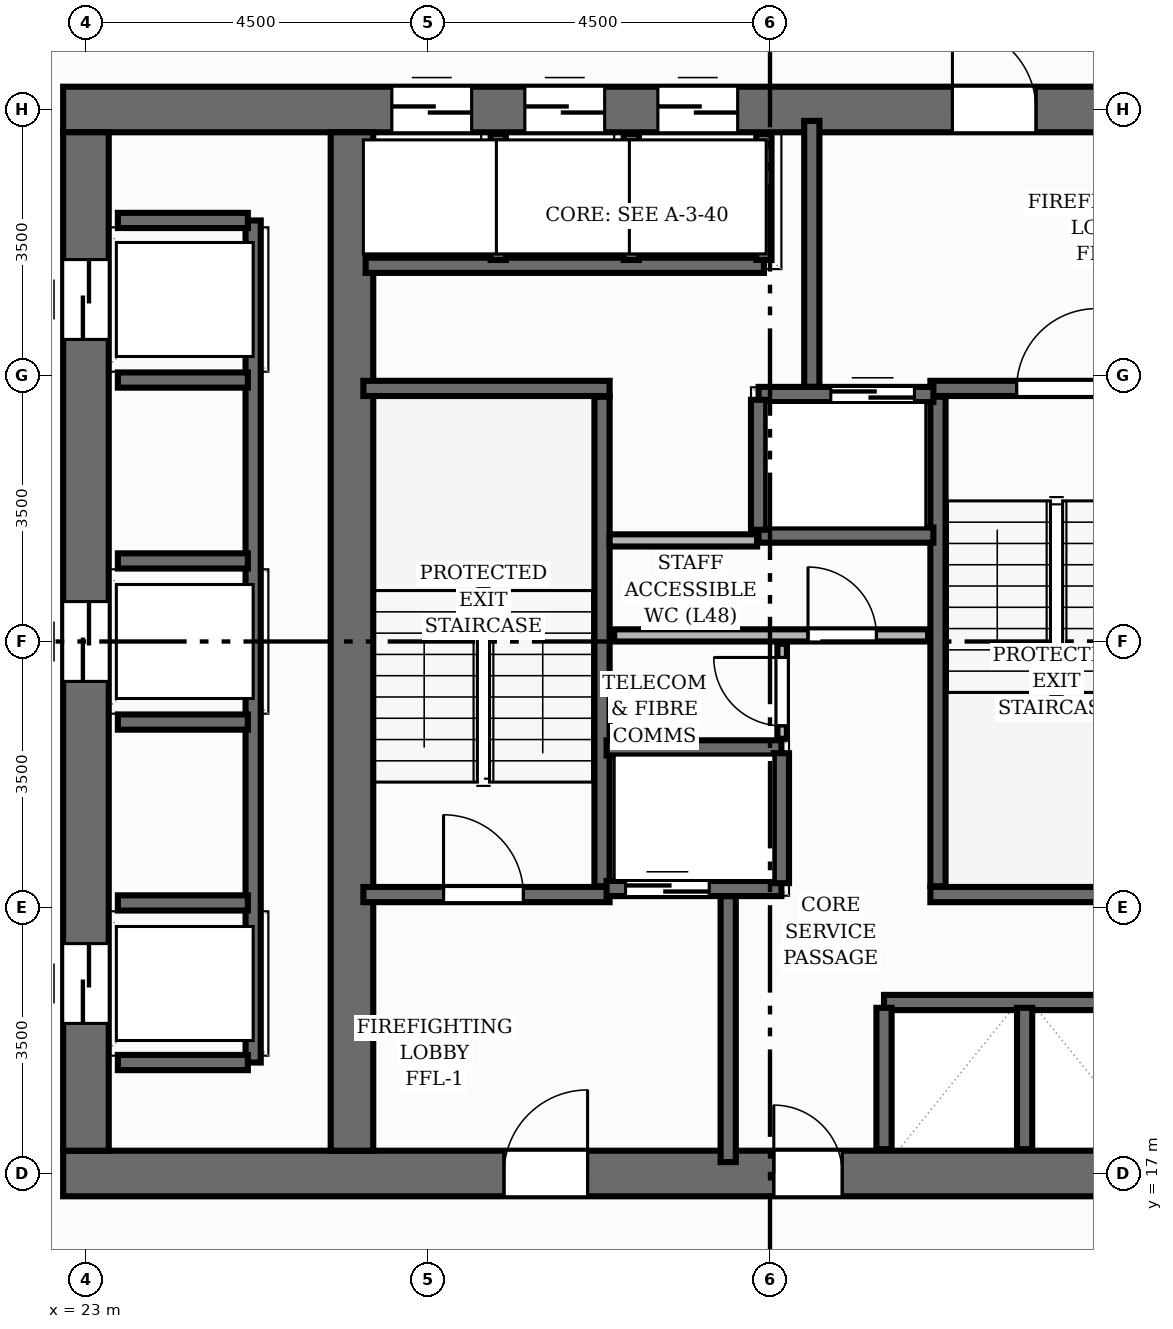
"""IFC4 building model, lengths in metres.
Left out: names, types, materials, properties, quantities, classifications, styles, units other than length and angle.
Written with IfcOpenShell. Run it as: python <this file> out.ifc"""

import sys

from ifc_helpers import new_model, si_unit, direction, frame, frame_2d, origin, place, context, subcontext, project, spatial, rectangle, extrude, element, fill, save


model = new_model("IFC4")
c1 = context("Model", 3, precision=1e-05, world=origin(), true_north=direction((0.0, 1.0)))
c2 = subcontext(c1, "Body", "Model", "MODEL_VIEW")
j1 = project(units=[si_unit("LENGTHUNIT", "METRE"), si_unit("PLANEANGLEUNIT", "RADIAN")], contexts=[c1])
p1 = place(None, origin())
s1 = spatial("IfcSite", under=j1, at=p1, CompositionType="ELEMENT")
p2 = place(p1, origin())
s2 = spatial("IfcBuilding", under=s1, at=p2, CompositionType="ELEMENT")
p3 = place(p2, frame((0.0, 0.0, 163.04)))
s3 = spatial("IfcBuildingStorey", under=s2, at=p3, CompositionType="ELEMENT", Elevation=163.04)
p4 = place(p3, frame((22.7, 17.0, 0.0), z_axis=(0.0, 0.0, 1.0), x_axis=(1.0, 0.0, 0.0)))
e1 = element("IfcWall", 1, at=p4, inside=s3, PredefinedType="SHEAR", context=c2, shape_type="SweptSolid", body=[
    extrude(rectangle(XDim=15.1, YDim=0.6, at=frame_2d((7.55, 0.0))), origin(), (0.0, 0.0, 1.0), 3.2),
])
p5 = place(p4, frame((5.8, 0.0, 0.0)))
e2 = element("IfcOpeningElement", 2, at=p5, cuts=e1, PredefinedType="OPENING", context=c2, shape_type="SweptSolid", body=[
    extrude(rectangle(XDim=1.1, YDim=2.15, at=frame_2d((0.55, 1.075))), frame((0.0, 0.31, 0.0), z_axis=(0.0, -1.0, 0.0), x_axis=(1.0, 0.0, 0.0)), (0.0, 0.0, 1.0), 0.62),
])
p6 = place(p4, frame((9.35, 0.0, 0.0)))
e3 = element("IfcOpeningElement", 3, at=p6, cuts=e1, PredefinedType="OPENING", context=c2, shape_type="SweptSolid", body=[
    extrude(rectangle(XDim=0.9, YDim=2.1, at=frame_2d((0.45, 1.05))), frame((0.0, 0.31, 0.0), z_axis=(0.0, -1.0, 0.0), x_axis=(1.0, 0.0, 0.0)), (0.0, 0.0, 1.0), 0.62),
])
p7 = place(p3, frame((22.7, 31.0, 0.0), z_axis=(0.0, 0.0, 1.0), x_axis=(1.0, 0.0, 0.0)))
e4 = element("IfcWall", 4, at=p7, inside=s3, PredefinedType="SHEAR", context=c2, shape_type="SweptSolid", body=[
    extrude(rectangle(XDim=15.1, YDim=0.6, at=frame_2d((7.55, 0.0))), origin(), (0.0, 0.0, 1.0), 3.2),
])
p8 = place(p7, frame((11.7, 0.0, 0.0)))
e5 = element("IfcOpeningElement", 5, at=p8, cuts=e4, PredefinedType="OPENING", context=c2, shape_type="SweptSolid", body=[
    extrude(rectangle(XDim=1.1, YDim=2.15, at=frame_2d((0.55, 1.075))), frame((0.0, 0.31, 0.0), z_axis=(0.0, -1.0, 0.0), x_axis=(1.0, 0.0, 0.0)), (0.0, 0.0, 1.0), 0.62),
])
p9 = place(p7, frame((4.325, 0.0, 0.0)))
e6 = element("IfcOpeningElement", 6, at=p9, cuts=e4, PredefinedType="OPENING", context=c2, shape_type="SweptSolid", body=[
    extrude(rectangle(XDim=1.05, YDim=2.15, at=frame_2d((0.525, 1.075))), frame((0.0, 0.31, 0.0), z_axis=(0.0, -1.0, 0.0), x_axis=(1.0, 0.0, 0.0)), (0.0, 0.0, 1.0), 0.62),
])
p10 = place(p7, frame((6.075, 0.0, 0.0)))
e7 = element("IfcOpeningElement", 7, at=p10, cuts=e4, PredefinedType="OPENING", context=c2, shape_type="SweptSolid", body=[
    extrude(rectangle(XDim=1.05, YDim=2.15, at=frame_2d((0.525, 1.075))), frame((0.0, 0.31, 0.0), z_axis=(0.0, -1.0, 0.0), x_axis=(1.0, 0.0, 0.0)), (0.0, 0.0, 1.0), 0.62),
])
p11 = place(p7, frame((7.825, 0.0, 0.0)))
e8 = element("IfcOpeningElement", 8, at=p11, cuts=e4, PredefinedType="OPENING", context=c2, shape_type="SweptSolid", body=[
    extrude(rectangle(XDim=1.05, YDim=2.15, at=frame_2d((0.525, 1.075))), frame((0.0, 0.31, 0.0), z_axis=(0.0, -1.0, 0.0), x_axis=(1.0, 0.0, 0.0)), (0.0, 0.0, 1.0), 0.62),
])
p12 = place(p3, frame((23.0, 17.3, 0.0), z_axis=(0.0, 0.0, 1.0), x_axis=(0.0, 1.0, 0.0)))
e9 = element("IfcWall", 9, at=p12, inside=s3, PredefinedType="SHEAR", context=c2, shape_type="SweptSolid", body=[
    extrude(rectangle(XDim=13.4, YDim=0.6, at=frame_2d((6.7, 0.0))), origin(), (0.0, 0.0, 1.0), 3.2),
])
p13 = place(p12, frame((1.675, 0.0, 0.0)))
e10 = element("IfcOpeningElement", 10, at=p13, cuts=e9, PredefinedType="OPENING", context=c2, shape_type="SweptSolid", body=[
    extrude(rectangle(XDim=1.05, YDim=2.15, at=frame_2d((0.525, 1.075))), frame((0.0, 0.31, 0.0), z_axis=(0.0, -1.0, 0.0), x_axis=(1.0, 0.0, 0.0)), (0.0, 0.0, 1.0), 0.62),
])
p14 = place(p12, frame((6.175, 0.0, 0.0)))
e11 = element("IfcOpeningElement", 11, at=p14, cuts=e9, PredefinedType="OPENING", context=c2, shape_type="SweptSolid", body=[
    extrude(rectangle(XDim=1.05, YDim=2.15, at=frame_2d((0.525, 1.075))), frame((0.0, 0.31, 0.0), z_axis=(0.0, -1.0, 0.0), x_axis=(1.0, 0.0, 0.0)), (0.0, 0.0, 1.0), 0.62),
])
p15 = place(p12, frame((10.675, 0.0, 0.0)))
e12 = element("IfcOpeningElement", 12, at=p15, cuts=e9, PredefinedType="OPENING", context=c2, shape_type="SweptSolid", body=[
    extrude(rectangle(XDim=1.05, YDim=2.15, at=frame_2d((0.525, 1.075))), frame((0.0, 0.31, 0.0), z_axis=(0.0, -1.0, 0.0), x_axis=(1.0, 0.0, 0.0)), (0.0, 0.0, 1.0), 0.62),
])
p16 = place(p3, frame((26.5, 17.3, 0.0), z_axis=(0.0, 0.0, 1.0), x_axis=(0.0, 1.0, 0.0)))
e13 = element("IfcWall", 13, at=p16, inside=s3, PredefinedType="SHEAR", context=c2, shape_type="SweptSolid", body=[
    extrude(rectangle(XDim=13.4, YDim=0.56, at=frame_2d((6.7, 0.0))), origin(), (0.0, 0.0, 1.0), 3.2),
])
p17 = place(p3, frame((29.79, 20.78, 0.0), z_axis=(0.0, 0.0, 1.0), x_axis=(0.0, 1.0, 0.0)))
e14 = element("IfcWall", 14, at=p17, inside=s3, PredefinedType="SHEAR", context=c2, shape_type="SweptSolid", body=[
    extrude(rectangle(XDim=6.44, YDim=0.2, at=frame_2d((3.22, 0.0))), origin(), (0.0, 0.0, 1.0), 3.2),
])
p18 = place(p3, frame((26.65, 27.33, 0.0), z_axis=(0.0, 0.0, 1.0), x_axis=(1.0, 0.0, 0.0)))
e15 = element("IfcWall", 15, at=p18, inside=s3, PredefinedType="SHEAR", context=c2, shape_type="SweptSolid", body=[
    extrude(rectangle(XDim=3.24, YDim=0.2, at=frame_2d((1.62, 0.0))), origin(), (0.0, 0.0, 1.0), 3.2),
])
p19 = place(p3, frame((26.65, 20.67, 0.0), z_axis=(0.0, 0.0, 1.0), x_axis=(1.0, 0.0, 0.0)))
e16 = element("IfcWall", 16, at=p19, inside=s3, PredefinedType="SHEAR", context=c2, shape_type="SweptSolid", body=[
    extrude(rectangle(XDim=3.24, YDim=0.2, at=frame_2d((1.62, 0.0))), origin(), (0.0, 0.0, 1.0), 3.2),
])
p20 = place(p19, frame((1.055, 0.0, 0.0)))
e17 = element("IfcOpeningElement", 17, at=p20, cuts=e16, PredefinedType="OPENING", context=c2, shape_type="SweptSolid", body=[
    extrude(rectangle(XDim=1.05, YDim=2.15, at=frame_2d((0.525, 1.075))), frame((0.0, 0.11, 0.0), z_axis=(0.0, -1.0, 0.0), x_axis=(1.0, 0.0, 0.0)), (0.0, 0.0, 1.0), 0.22),
])
p21 = place(p3, frame((34.21, 20.78, 0.0), z_axis=(0.0, 0.0, 1.0), x_axis=(0.0, 1.0, 0.0)))
e18 = element("IfcWall", 18, at=p21, inside=s3, PredefinedType="SHEAR", context=c2, shape_type="SweptSolid", body=[
    extrude(rectangle(XDim=6.44, YDim=0.2, at=frame_2d((3.22, 0.0))), origin(), (0.0, 0.0, 1.0), 3.2),
])
p22 = place(p3, frame((34.11, 20.67, 0.0), z_axis=(0.0, 0.0, 1.0), x_axis=(1.0, 0.0, 0.0)))
e19 = element("IfcWall", 19, at=p22, inside=s3, PredefinedType="SHEAR", context=c2, shape_type="SweptSolid", body=[
    extrude(rectangle(XDim=3.24, YDim=0.2, at=frame_2d((1.62, 0.0))), origin(), (0.0, 0.0, 1.0), 3.2),
])
p23 = place(p3, frame((34.11, 27.33, 0.0), z_axis=(0.0, 0.0, 1.0), x_axis=(1.0, 0.0, 0.0)))
e20 = element("IfcWall", 20, at=p23, inside=s3, PredefinedType="SHEAR", context=c2, shape_type="SweptSolid", body=[
    extrude(rectangle(XDim=3.24, YDim=0.2, at=frame_2d((1.62, 0.0))), origin(), (0.0, 0.0, 1.0), 3.2),
])
p24 = place(p23, frame((1.135, 0.0, 0.0)))
e21 = element("IfcOpeningElement", 21, at=p24, cuts=e20, PredefinedType="OPENING", context=c2, shape_type="SweptSolid", body=[
    extrude(rectangle(XDim=1.05, YDim=2.15, at=frame_2d((0.525, 1.075))), frame((0.0, 0.11, 0.0), z_axis=(0.0, -1.0, 0.0), x_axis=(1.0, 0.0, 0.0)), (0.0, 0.0, 1.0), 0.22),
])
for number, where, z_axis, x_axis in (
    (22, (31.45, 17.15, 0.0), (0.0, 0.0, 1.0), (0.0, 1.0, 0.0)),
    (23, (32.55, 27.35, 0.0), (0.0, 0.0, 1.0), (0.0, 1.0, 0.0)),
):
    element("IfcWall", number, at=place(p3, frame(where, z_axis=z_axis, x_axis=x_axis)), inside=s3, PredefinedType="SHEAR", context=c2, shape_type="SweptSolid", body=[
        extrude(rectangle(XDim=3.5, YDim=0.2, at=frame_2d((1.75, 0.0))), origin(), (0.0, 0.0, 1.0), 3.2),
    ])
p25 = place(p3, frame((29.85, 20.75, 0.0), z_axis=(0.0, 0.0, 1.0), x_axis=(1.0, 0.0, 0.0)))
e24 = element("IfcWall", 24, at=p25, inside=s3, PredefinedType="SHEAR", context=c2, shape_type="SweptSolid", body=[
    extrude(rectangle(XDim=2.3, YDim=0.2, at=frame_2d((1.15, 0.0))), origin(), (0.0, 0.0, 1.0), 3.2),
])
p26 = place(p25, frame((0.25, 0.0, 0.0)))
e25 = element("IfcOpeningElement", 25, at=p26, cuts=e24, PredefinedType="OPENING", context=c2, shape_type="SweptSolid", body=[
    extrude(rectangle(XDim=1.1, YDim=2.15, at=frame_2d((0.55, 1.075))), frame((0.0, 0.11, 0.0), z_axis=(0.0, -1.0, 0.0), x_axis=(1.0, 0.0, 0.0)), (0.0, 0.0, 1.0), 0.22),
])
p27 = place(p3, frame((29.85, 22.6, 0.0), z_axis=(0.0, 0.0, 1.0), x_axis=(1.0, 0.0, 0.0)))
e26 = element("IfcWall", 26, at=p27, inside=s3, PredefinedType="SHEAR", context=c2, shape_type="SweptSolid", body=[
    extrude(rectangle(XDim=2.3, YDim=0.2, at=frame_2d((1.15, 0.0))), origin(), (0.0, 0.0, 1.0), 3.2),
])
p28 = place(p3, frame((32.15, 20.82, 0.0), z_axis=(0.0, 0.0, 1.0), x_axis=(0.0, 1.0, 0.0)))
e27 = element("IfcWall", 27, at=p28, inside=s3, PredefinedType="SHEAR", context=c2, shape_type="SweptSolid", body=[
    extrude(rectangle(XDim=1.71, YDim=0.2, at=frame_2d((0.855, 0.0))), origin(), (0.0, 0.0, 1.0), 3.2),
])
p29 = place(p3, frame((31.85, 27.25, 0.0), z_axis=(0.0, 0.0, 1.0), x_axis=(1.0, 0.0, 0.0)))
e28 = element("IfcWall", 28, at=p29, inside=s3, PredefinedType="SHEAR", context=c2, shape_type="SweptSolid", body=[
    extrude(rectangle(XDim=2.3, YDim=0.2, at=frame_2d((1.15, 0.0))), origin(), (0.0, 0.0, 1.0), 3.2),
])
p30 = place(p29, frame((0.95, 0.0, 0.0)))
e29 = element("IfcOpeningElement", 29, at=p30, cuts=e28, PredefinedType="OPENING", context=c2, shape_type="SweptSolid", body=[
    extrude(rectangle(XDim=1.1, YDim=2.15, at=frame_2d((0.55, 1.075))), frame((0.0, 0.11, 0.0), z_axis=(0.0, -1.0, 0.0), x_axis=(1.0, 0.0, 0.0)), (0.0, 0.0, 1.0), 0.22),
])
p31 = place(p3, frame((31.85, 25.4, 0.0), z_axis=(0.0, 0.0, 1.0), x_axis=(1.0, 0.0, 0.0)))
e30 = element("IfcWall", 30, at=p31, inside=s3, PredefinedType="SHEAR", context=c2, shape_type="SweptSolid", body=[
    extrude(rectangle(XDim=2.3, YDim=0.2, at=frame_2d((1.15, 0.0))), origin(), (0.0, 0.0, 1.0), 3.2),
])
p32 = place(p3, frame((31.85, 25.47, 0.0), z_axis=(0.0, 0.0, 1.0), x_axis=(0.0, 1.0, 0.0)))
e31 = element("IfcWall", 31, at=p32, inside=s3, PredefinedType="SHEAR", context=c2, shape_type="SweptSolid", body=[
    extrude(rectangle(XDim=1.71, YDim=0.2, at=frame_2d((0.855, 0.0))), origin(), (0.0, 0.0, 1.0), 3.2),
])
p33 = place(p3, frame((25.2, 18.46, 0.0), z_axis=(0.0, 0.0, 1.0), x_axis=(0.0, 1.0, 0.0)))
e32 = element("IfcWall", 32, at=p33, inside=s3, PredefinedType="SHEAR", context=c2, shape_type="SweptSolid", body=[
    extrude(rectangle(XDim=11.08, YDim=0.2, at=frame_2d((5.54, 0.0))), origin(), (0.0, 0.0, 1.0), 3.2),
])
for number, where, z_axis, x_axis in (
    (33, (23.42, 18.46, 0.0), (0.0, 0.0, 1.0), (1.0, 0.0, 0.0)),
    (34, (23.42, 29.54, 0.0), (0.0, 0.0, 1.0), (1.0, 0.0, 0.0)),
    (35, (23.42, 20.56, 0.0), (0.0, 0.0, 1.0), (1.0, 0.0, 0.0)),
    (36, (23.42, 22.94, 0.0), (0.0, 0.0, 1.0), (1.0, 0.0, 0.0)),
    (37, (23.42, 25.06, 0.0), (0.0, 0.0, 1.0), (1.0, 0.0, 0.0)),
    (38, (23.42, 27.44, 0.0), (0.0, 0.0, 1.0), (1.0, 0.0, 0.0)),
):
    element("IfcWall", number, at=place(p3, frame(where, z_axis=z_axis, x_axis=x_axis)), inside=s3, PredefinedType="SHEAR", context=c2, shape_type="SweptSolid", body=[
        extrude(rectangle(XDim=1.71, YDim=0.2, at=frame_2d((0.855, 0.0))), origin(), (0.0, 0.0, 1.0), 3.2),
    ])
p34 = place(p3, frame((26.68, 28.95, 0.0), z_axis=(0.0, 0.0, 1.0), x_axis=(1.0, 0.0, 0.0)))
e39 = element("IfcWall", 39, at=p34, inside=s3, PredefinedType="SHEAR", context=c2, shape_type="SweptSolid", body=[
    extrude(rectangle(XDim=5.24, YDim=0.2, at=frame_2d((2.62, 0.0))), origin(), (0.0, 0.0, 1.0), 3.2),
])
for number, where, z_axis, x_axis in (
    (40, (31.92, 29.02, 0.0), (0.0, 0.0, 1.0), (0.0, 1.0, 0.0)),
    (41, (28.425, 29.02, 0.0), (0.0, 0.0, 1.0), (0.0, 1.0, 0.0)),
    (42, (30.175, 29.02, 0.0), (0.0, 0.0, 1.0), (0.0, 1.0, 0.0)),
):
    element("IfcWall", number, at=place(p3, frame(where, z_axis=z_axis, x_axis=x_axis)), inside=s3, PredefinedType="SHEAR", context=c2, shape_type="SweptSolid", body=[
        extrude(rectangle(XDim=1.66, YDim=0.2, at=frame_2d((0.83, 0.0))), origin(), (0.0, 0.0, 1.0), 3.2),
    ])
p35 = place(p3, frame((33.5, 19.25, 0.0), z_axis=(0.0, 0.0, 1.0), x_axis=(1.0, 0.0, 0.0)))
e43 = element("IfcWall", 43, at=p35, inside=s3, PredefinedType="SHEAR", context=c2, shape_type="SweptSolid", body=[
    extrude(rectangle(XDim=3.72, YDim=0.2, at=frame_2d((1.86, 0.0))), origin(), (0.0, 0.0, 1.0), 3.2),
])
for number, where, z_axis, x_axis in (
    (44, (33.5, 17.32, 0.0), (0.0, 0.0, 1.0), (0.0, 1.0, 0.0)),
    (45, (35.35, 17.32, 0.0), (0.0, 0.0, 1.0), (0.0, 1.0, 0.0)),
):
    element("IfcWall", number, at=place(p3, frame(where, z_axis=z_axis, x_axis=x_axis)), inside=s3, PredefinedType="SHEAR", context=c2, shape_type="SweptSolid", body=[
        extrude(rectangle(XDim=1.86, YDim=0.2, at=frame_2d((0.93, 0.0))), origin(), (0.0, 0.0, 1.0), 3.2),
    ])
p36 = place(p3, frame((29.95, 24.08, 0.0), z_axis=(0.0, 0.0, 1.0), x_axis=(1.0, 0.0, 0.0)))
e46 = element("IfcWall", 46, at=p36, inside=s3, PredefinedType="PLUMBINGWALL", context=c2, shape_type="SweptSolid", body=[
    extrude(rectangle(XDim=4.13, YDim=0.16, at=frame_2d((2.065, 0.0))), origin(), (0.0, 0.0, 1.0), 2.955),
])
p37 = place(p36, frame((2.55, 0.0, 0.0)))
e47 = element("IfcOpeningElement", 47, at=p37, cuts=e46, PredefinedType="OPENING", context=c2, shape_type="SweptSolid", body=[
    extrude(rectangle(XDim=0.9, YDim=2.1, at=frame_2d((0.45, 1.05))), frame((0.0, 0.09, 0.0), z_axis=(0.0, -1.0, 0.0), x_axis=(1.0, 0.0, 0.0)), (0.0, 0.0, 1.0), 0.18),
])
p38 = place(p3, frame((32.16, 22.72, 0.0), z_axis=(0.0, 0.0, 1.0), x_axis=(0.0, 1.0, 0.0)))
e48 = element("IfcWall", 48, at=p38, inside=s3, PredefinedType="PARTITIONING", context=c2, shape_type="SweptSolid", body=[
    extrude(rectangle(XDim=1.25, YDim=0.125, at=frame_2d((0.625, 0.0))), origin(), (0.0, 0.0, 1.0), 2.955),
])
p39 = place(p38, frame((0.17, 0.0, 0.0)))
e49 = element("IfcOpeningElement", 49, at=p39, cuts=e48, PredefinedType="OPENING", context=c2, shape_type="SweptSolid", body=[
    extrude(rectangle(XDim=0.9, YDim=2.1, at=frame_2d((0.45, 1.05))), frame((0.0, 0.073, 0.0), z_axis=(0.0, -1.0, 0.0), x_axis=(1.0, 0.0, 0.0)), (0.0, 0.0, 1.0), 0.145),
])
p40 = place(p3, frame((29.89, 25.33, 0.0), z_axis=(0.0, 0.0, 1.0), x_axis=(1.0, 0.0, 0.0)))
e50 = element("IfcWall", 50, at=p40, inside=s3, PredefinedType="PLUMBINGWALL", context=c2, shape_type="SweptSolid", body=[
    extrude(rectangle(XDim=1.94, YDim=0.16, at=frame_2d((0.97, 0.0))), origin(), (0.0, 0.0, 1.0), 2.955),
])
p41 = place(p20, origin())
e51 = element("IfcDoor", 51, at=p41, inside=s3, OperationType="SINGLE_SWING_LEFT", PredefinedType="DOOR", context=c2, shape_type="SweptSolid", body=[
    extrude(rectangle(XDim=1.05, YDim=2.15, at=frame_2d((0.525, 1.075))), frame((0.0, 0.025, 0.0), z_axis=(0.0, -1.0, 0.0), x_axis=(1.0, 0.0, 0.0)), (0.0, 0.0, 1.0), 0.05),
])
fill(e17, e51)
p42 = place(p24, origin())
e52 = element("IfcDoor", 52, at=p42, inside=s3, OperationType="SINGLE_SWING_RIGHT", PredefinedType="DOOR", context=c2, shape_type="SweptSolid", body=[
    extrude(rectangle(XDim=1.05, YDim=2.15, at=frame_2d((0.525, 1.075))), frame((0.0, 0.025, 0.0), z_axis=(0.0, -1.0, 0.0), x_axis=(1.0, 0.0, 0.0)), (0.0, 0.0, 1.0), 0.05),
])
fill(e21, e52)
p43 = place(p5, origin())
e53 = element("IfcDoor", 53, at=p43, inside=s3, OperationType="SINGLE_SWING_RIGHT", PredefinedType="DOOR", context=c2, shape_type="SweptSolid", body=[
    extrude(rectangle(XDim=1.1, YDim=2.15, at=frame_2d((0.55, 1.075))), frame((0.0, 0.025, 0.0), z_axis=(0.0, -1.0, 0.0), x_axis=(1.0, 0.0, 0.0)), (0.0, 0.0, 1.0), 0.05),
])
fill(e2, e53)
p44 = place(p8, origin())
e54 = element("IfcDoor", 54, at=p44, inside=s3, OperationType="SINGLE_SWING_LEFT", PredefinedType="DOOR", context=c2, shape_type="SweptSolid", body=[
    extrude(rectangle(XDim=1.1, YDim=2.15, at=frame_2d((0.55, 1.075))), frame((0.0, 0.025, 0.0), z_axis=(0.0, -1.0, 0.0), x_axis=(1.0, 0.0, 0.0)), (0.0, 0.0, 1.0), 0.05),
])
fill(e5, e54)
p45 = place(p26, origin())
e55 = element("IfcDoor", 55, at=p45, inside=s3, OperationType="DOUBLE_DOOR_SLIDING", PredefinedType="DOOR", context=c2, shape_type="SweptSolid", body=[
    extrude(rectangle(XDim=1.1, YDim=2.15, at=frame_2d((0.55, 1.075))), frame((0.0, 0.025, 0.0), z_axis=(0.0, -1.0, 0.0), x_axis=(1.0, 0.0, 0.0)), (0.0, 0.0, 1.0), 0.05),
])
fill(e25, e55)
p46 = place(p30, origin())
e56 = element("IfcDoor", 56, at=p46, inside=s3, OperationType="DOUBLE_DOOR_SLIDING", PredefinedType="DOOR", context=c2, shape_type="SweptSolid", body=[
    extrude(rectangle(XDim=1.1, YDim=2.15, at=frame_2d((0.55, 1.075))), frame((0.0, 0.025, 0.0), z_axis=(0.0, -1.0, 0.0), x_axis=(1.0, 0.0, 0.0)), (0.0, 0.0, 1.0), 0.05),
])
fill(e29, e56)
p47 = place(p13, origin())
e57 = element("IfcDoor", 57, at=p47, inside=s3, OperationType="DOUBLE_DOOR_SLIDING", PredefinedType="DOOR", context=c2, shape_type="SweptSolid", body=[
    extrude(rectangle(XDim=1.05, YDim=2.15, at=frame_2d((0.525, 1.075))), frame((0.0, 0.025, 0.0), z_axis=(0.0, -1.0, 0.0), x_axis=(1.0, 0.0, 0.0)), (0.0, 0.0, 1.0), 0.05),
])
fill(e10, e57)
p48 = place(p14, origin())
e58 = element("IfcDoor", 58, at=p48, inside=s3, OperationType="DOUBLE_DOOR_SLIDING", PredefinedType="DOOR", context=c2, shape_type="SweptSolid", body=[
    extrude(rectangle(XDim=1.05, YDim=2.15, at=frame_2d((0.525, 1.075))), frame((0.0, 0.025, 0.0), z_axis=(0.0, -1.0, 0.0), x_axis=(1.0, 0.0, 0.0)), (0.0, 0.0, 1.0), 0.05),
])
fill(e11, e58)
p49 = place(p15, origin())
e59 = element("IfcDoor", 59, at=p49, inside=s3, OperationType="DOUBLE_DOOR_SLIDING", PredefinedType="DOOR", context=c2, shape_type="SweptSolid", body=[
    extrude(rectangle(XDim=1.05, YDim=2.15, at=frame_2d((0.525, 1.075))), frame((0.0, 0.025, 0.0), z_axis=(0.0, -1.0, 0.0), x_axis=(1.0, 0.0, 0.0)), (0.0, 0.0, 1.0), 0.05),
])
fill(e12, e59)
p50 = place(p9, origin())
e60 = element("IfcDoor", 60, at=p50, inside=s3, OperationType="DOUBLE_DOOR_SLIDING", PredefinedType="DOOR", context=c2, shape_type="SweptSolid", body=[
    extrude(rectangle(XDim=1.05, YDim=2.15, at=frame_2d((0.525, 1.075))), frame((0.0, 0.025, 0.0), z_axis=(0.0, -1.0, 0.0), x_axis=(1.0, 0.0, 0.0)), (0.0, 0.0, 1.0), 0.05),
])
fill(e6, e60)
p51 = place(p10, origin())
e61 = element("IfcDoor", 61, at=p51, inside=s3, OperationType="DOUBLE_DOOR_SLIDING", PredefinedType="DOOR", context=c2, shape_type="SweptSolid", body=[
    extrude(rectangle(XDim=1.05, YDim=2.15, at=frame_2d((0.525, 1.075))), frame((0.0, 0.025, 0.0), z_axis=(0.0, -1.0, 0.0), x_axis=(1.0, 0.0, 0.0)), (0.0, 0.0, 1.0), 0.05),
])
fill(e7, e61)
p52 = place(p11, origin())
e62 = element("IfcDoor", 62, at=p52, inside=s3, OperationType="DOUBLE_DOOR_SLIDING", PredefinedType="DOOR", context=c2, shape_type="SweptSolid", body=[
    extrude(rectangle(XDim=1.05, YDim=2.15, at=frame_2d((0.525, 1.075))), frame((0.0, 0.025, 0.0), z_axis=(0.0, -1.0, 0.0), x_axis=(1.0, 0.0, 0.0)), (0.0, 0.0, 1.0), 0.05),
])
fill(e8, e62)
p53 = place(p6, origin())
e63 = element("IfcDoor", 63, at=p53, inside=s3, OperationType="SINGLE_SWING_LEFT", PredefinedType="DOOR", context=c2, shape_type="SweptSolid", body=[
    extrude(rectangle(XDim=0.9, YDim=2.1, at=frame_2d((0.45, 1.05))), frame((0.0, 0.025, 0.0), z_axis=(0.0, -1.0, 0.0), x_axis=(1.0, 0.0, 0.0)), (0.0, 0.0, 1.0), 0.05),
])
fill(e3, e63)
p54 = place(p37, origin())
e64 = element("IfcDoor", 64, at=p54, inside=s3, OperationType="SINGLE_SWING_LEFT", PredefinedType="DOOR", context=c2, shape_type="SweptSolid", body=[
    extrude(rectangle(XDim=0.9, YDim=2.1, at=frame_2d((0.45, 1.05))), frame((0.0, 0.025, 0.0), z_axis=(0.0, -1.0, 0.0), x_axis=(1.0, 0.0, 0.0)), (0.0, 0.0, 1.0), 0.05),
])
fill(e47, e64)
p55 = place(p39, origin())
e65 = element("IfcDoor", 65, at=p55, inside=s3, OperationType="SINGLE_SWING_RIGHT", PredefinedType="DOOR", context=c2, shape_type="SweptSolid", body=[
    extrude(rectangle(XDim=0.9, YDim=2.1, at=frame_2d((0.45, 1.05))), frame((0.0, 0.025, 0.0), z_axis=(0.0, -1.0, 0.0), x_axis=(1.0, 0.0, 0.0)), (0.0, 0.0, 1.0), 0.05),
])
fill(e49, e65)
save(model, sys.argv[1])
